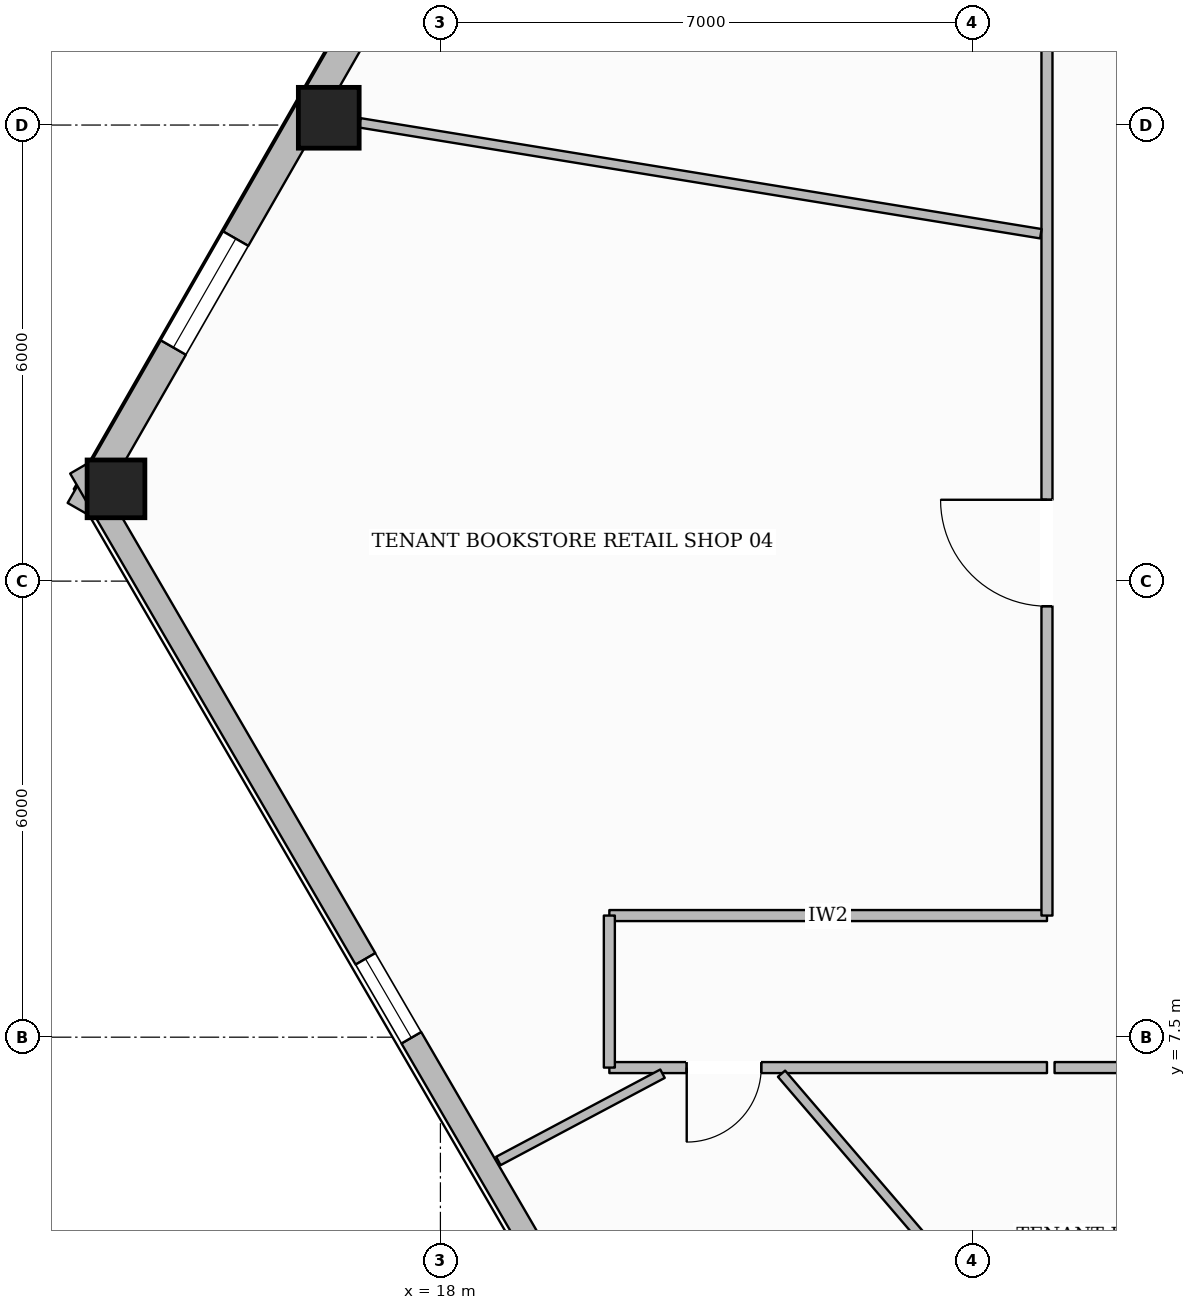
"""IFC4 building model, lengths in metres.
Left out: names, types, materials, properties, quantities, classifications, styles, units other than length and angle.
Written with IfcOpenShell. Run it as: python <this file> out.ifc"""

import sys

from ifc_helpers import new_model, si_unit, direction, frame, frame_2d, origin, origin_2d, place, context, subcontext, project, spatial, rectangle, hollow_rectangle, extrude, element, fill, save


model = new_model("IFC4")
c1 = context("Model", 3, precision=1e-05, world=origin(), true_north=direction((0.0, 1.0)))
c2 = subcontext(c1, "Body", "Model", "MODEL_VIEW")
j1 = project(units=[si_unit("LENGTHUNIT", "METRE"), si_unit("PLANEANGLEUNIT", "RADIAN")], contexts=[c1])
p1 = place(None, origin())
s1 = spatial("IfcSite", under=j1, at=p1, CompositionType="ELEMENT")
p2 = place(p1, origin())
s2 = spatial("IfcBuilding", under=s1, at=p2, CompositionType="ELEMENT")
p3 = place(p2, frame((0.0, 0.0, 44.5)))
s3 = spatial("IfcBuildingStorey", under=s2, at=p3, CompositionType="ELEMENT", Elevation=44.5)
p4 = place(p3, frame((16.531, 19.596, 0.0), z_axis=(0.0, 0.0, 1.0), x_axis=(1.0, 0.0, 0.0)))
e1 = element("IfcColumn", 1, at=p4, inside=s3, PredefinedType="COLUMN", context=c2, shape_type="SweptSolid", body=[
    extrude(hollow_rectangle(XDim=0.8, YDim=0.8, WallThickness=0.036, at=origin_2d()), origin(), (0.0, 0.0, 1.0), 3.59),
])
p5 = place(p3, frame((13.732, 14.714, 0.0), z_axis=(0.0, 0.0, 1.0), x_axis=(1.0, 0.0, 0.0)))
e2 = element("IfcColumn", 2, at=p5, inside=s3, PredefinedType="COLUMN", context=c2, shape_type="SweptSolid", body=[
    extrude(hollow_rectangle(XDim=0.76, YDim=0.76, WallThickness=0.035, at=origin_2d()), origin(), (0.0, 0.0, 1.0), 3.59),
])
p6 = place(p3, frame((13.26, 14.434, 0.0), z_axis=(0.0, 0.0, 1.0), x_axis=(0.497388557453, 0.867527880194, 0.0)))
e3 = element("IfcWall", 3, at=p6, inside=s3, PredefinedType="STANDARD", context=c2, shape_type="SweptSolid", body=[
    extrude(rectangle(XDim=34.723, YDim=0.38, at=frame_2d((17.361, 0.0))), origin(), (0.0, 0.0, 1.0), 2.97),
])
p7 = place(p6, frame((30.604, 0.0, 0.65)))
e4 = element("IfcOpeningElement", 4, at=p7, cuts=e3, PredefinedType="OPENING", context=c2, shape_type="SweptSolid", body=[
    extrude(rectangle(XDim=1.65, YDim=1.75, at=frame_2d((0.825, 0.875))), frame((0.0, 0.2, 0.0), z_axis=(0.0, -1.0, 0.0), x_axis=(1.0, 0.0, 0.0)), (0.0, 0.0, 1.0), 0.4),
])
p8 = place(p6, frame((24.976, 0.0, 0.65)))
e5 = element("IfcOpeningElement", 5, at=p8, cuts=e3, PredefinedType="OPENING", context=c2, shape_type="SweptSolid", body=[
    extrude(rectangle(XDim=1.65, YDim=1.75, at=frame_2d((0.825, 0.875))), frame((0.0, 0.2, 0.0), z_axis=(0.0, -1.0, 0.0), x_axis=(1.0, 0.0, 0.0)), (0.0, 0.0, 1.0), 0.4),
])
p9 = place(p6, frame((13.721, 0.0, 0.65)))
e6 = element("IfcOpeningElement", 6, at=p9, cuts=e3, PredefinedType="OPENING", context=c2, shape_type="SweptSolid", body=[
    extrude(rectangle(XDim=1.65, YDim=1.75, at=frame_2d((0.825, 0.875))), frame((0.0, 0.2, 0.0), z_axis=(0.0, -1.0, 0.0), x_axis=(1.0, 0.0, 0.0)), (0.0, 0.0, 1.0), 0.4),
])
p10 = place(p6, frame((8.094, 0.0, 0.65)))
e7 = element("IfcOpeningElement", 7, at=p10, cuts=e3, PredefinedType="OPENING", context=c2, shape_type="SweptSolid", body=[
    extrude(rectangle(XDim=1.65, YDim=1.75, at=frame_2d((0.825, 0.875))), frame((0.0, 0.2, 0.0), z_axis=(0.0, -1.0, 0.0), x_axis=(1.0, 0.0, 0.0)), (0.0, 0.0, 1.0), 0.4),
])
p11 = place(p6, frame((2.466, 0.0, 0.65)))
e8 = element("IfcOpeningElement", 8, at=p11, cuts=e3, PredefinedType="OPENING", context=c2, shape_type="SweptSolid", body=[
    extrude(rectangle(XDim=1.65, YDim=1.75, at=frame_2d((0.825, 0.875))), frame((0.0, 0.2, 0.0), z_axis=(0.0, -1.0, 0.0), x_axis=(1.0, 0.0, 0.0)), (0.0, 0.0, 1.0), 0.4),
])
p12 = place(p3, frame((21.373, 1.033, 0.0), z_axis=(0.0, 0.0, 1.0), x_axis=(-0.502582346065, 0.864529343298, 0.0)))
e9 = element("IfcWall", 9, at=p12, inside=s3, PredefinedType="STANDARD", context=c2, shape_type="SweptSolid", body=[
    extrude(rectangle(XDim=16.145, YDim=0.3, at=frame_2d((8.072, 0.0))), origin(), (0.0, 0.0, 1.0), 2.97),
])
p13 = place(p12, frame((7.472, 0.0, 0.65)))
e10 = element("IfcOpeningElement", 10, at=p13, cuts=e9, PredefinedType="OPENING", context=c2, shape_type="SweptSolid", body=[
    extrude(rectangle(XDim=1.2, YDim=1.7, at=frame_2d((0.6, 0.85))), frame((0.0, 0.16, 0.0), z_axis=(0.0, -1.0, 0.0), x_axis=(1.0, 0.0, 0.0)), (0.0, 0.0, 1.0), 0.32),
])
p14 = place(p3, frame((20.223, 9.1, 0.0), z_axis=(0.0, 0.0, 1.0), x_axis=(1.0, 0.0, 0.0)))
e11 = element("IfcWall", 11, at=p14, inside=s3, PredefinedType="PARTITIONING", context=c2, shape_type="SweptSolid", body=[
    extrude(rectangle(XDim=5.757, YDim=0.145, at=frame_2d((2.879, 0.0))), origin(), (0.0, 0.0, 1.0), 3.59),
])
p15 = place(p3, frame((25.98, 9.1, 0.0), z_axis=(0.0, 0.0, 1.0), x_axis=(0.0, 1.0, 0.0)))
e12 = element("IfcWall", 12, at=p15, inside=s3, PredefinedType="PARTITIONING", context=c2, shape_type="SweptSolid", body=[
    extrude(rectangle(XDim=16.0, YDim=0.145, at=frame_2d((8.0, 0.0))), origin(), (0.0, 0.0, 1.0), 3.278),
])
p16 = place(p15, frame((4.07, 0.0, 0.0)))
e13 = element("IfcOpeningElement", 13, at=p16, cuts=e12, PredefinedType="OPENING", context=c2, shape_type="SweptSolid", body=[
    extrude(rectangle(XDim=1.4, YDim=2.2, at=frame_2d((0.7, 1.1))), frame((0.0, 0.083, 0.0), z_axis=(0.0, -1.0, 0.0), x_axis=(1.0, 0.0, 0.0)), (0.0, 0.0, 1.0), 0.165),
])
p17 = place(p3, frame((49.92, 7.1, 0.0), z_axis=(0.0, 0.0, 1.0), x_axis=(-1.0, 0.0, 0.0)))
e14 = element("IfcWall", 14, at=p17, inside=s3, PredefinedType="PARTITIONING", context=c2, shape_type="SweptSolid", body=[
    extrude(rectangle(XDim=23.84, YDim=0.145, at=frame_2d((11.92, 0.0))), origin(), (0.0, 0.0, 1.0), 3.278),
])
p18 = place(p17, frame((20.935, 0.0, 0.0)))
e15 = element("IfcOpeningElement", 15, at=p18, cuts=e14, PredefinedType="OPENING", context=c2, shape_type="SweptSolid", body=[
    extrude(rectangle(XDim=0.98, YDim=2.15, at=frame_2d((0.49, 1.075))), frame((0.0, 0.083, 0.0), z_axis=(0.0, -1.0, 0.0), x_axis=(1.0, 0.0, 0.0)), (0.0, 0.0, 1.0), 0.165),
])
p19 = place(p17, frame((11.043, 0.0, 0.0)))
e16 = element("IfcOpeningElement", 16, at=p19, cuts=e14, PredefinedType="OPENING", context=c2, shape_type="SweptSolid", body=[
    extrude(rectangle(XDim=1.4, YDim=2.2, at=frame_2d((0.7, 1.1))), frame((0.0, 0.083, 0.0), z_axis=(0.0, -1.0, 0.0), x_axis=(1.0, 0.0, 0.0)), (0.0, 0.0, 1.0), 0.165),
])
p20 = place(p3, frame((25.98, 7.1, 0.0), z_axis=(0.0, 0.0, 1.0), x_axis=(-1.0, 0.0, 0.0)))
e17 = element("IfcWall", 17, at=p20, inside=s3, PredefinedType="PARTITIONING", context=c2, shape_type="SweptSolid", body=[
    extrude(rectangle(XDim=5.757, YDim=0.145, at=frame_2d((2.879, 0.0))), origin(), (0.0, 0.0, 1.0), 3.59),
])
p21 = place(p20, frame((3.76, 0.0, 0.0)))
e18 = element("IfcOpeningElement", 18, at=p21, cuts=e17, PredefinedType="OPENING", context=c2, shape_type="SweptSolid", body=[
    extrude(rectangle(XDim=0.98, YDim=2.15, at=frame_2d((0.49, 1.075))), frame((0.0, 0.083, 0.0), z_axis=(0.0, -1.0, 0.0), x_axis=(1.0, 0.0, 0.0)), (0.0, 0.0, 1.0), 0.165),
])
p22 = place(p3, frame((20.223, 7.1, 0.0), z_axis=(0.0, 0.0, 1.0), x_axis=(0.0, 1.0, 0.0)))
e19 = element("IfcWall", 19, at=p22, inside=s3, PredefinedType="PARTITIONING", context=c2, shape_type="SweptSolid", body=[
    extrude(rectangle(XDim=2.0, YDim=0.145, at=frame_2d((1.0, 0.0))), origin(), (0.0, 0.0, 1.0), 3.59),
])
p23 = place(p3, frame((25.899, 18.07, 0.0), z_axis=(0.0, 0.0, 1.0), x_axis=(-0.987001219007, 0.16071276763, 0.0)))
e20 = element("IfcWall", 20, at=p23, inside=s3, PredefinedType="PARTITIONING", context=c2, shape_type="SweptSolid", body=[
    extrude(rectangle(XDim=9.078, YDim=0.125, at=frame_2d((4.539, 0.0))), origin(), (0.0, 0.0, 1.0), 3.057),
])
p24 = place(p3, frame((20.922, 7.02, 0.0), z_axis=(0.0, 0.0, 1.0), x_axis=(-0.882926972808, -0.469510341407, 0.0)))
e21 = element("IfcWall", 21, at=p24, inside=s3, PredefinedType="PARTITIONING", context=c2, shape_type="SweptSolid", body=[
    extrude(rectangle(XDim=2.446, YDim=0.125, at=frame_2d((1.223, 0.0))), origin(), (0.0, 0.0, 1.0), 3.59),
])
p25 = place(p3, frame((22.488, 7.02, 0.0), z_axis=(0.0, 0.0, 1.0), x_axis=(0.651248981465, -0.758864127588, 0.0)))
e22 = element("IfcWall", 22, at=p25, inside=s3, PredefinedType="PARTITIONING", context=c2, shape_type="SweptSolid", body=[
    extrude(rectangle(XDim=6.677, YDim=0.125, at=frame_2d((3.338, 0.0))), origin(), (0.0, 0.0, 1.0), 3.59),
])
p26 = place(p11, origin())
e23 = element("IfcWindow", 23, at=p26, inside=s3, PartitioningType="SINGLE_PANEL", PredefinedType="WINDOW", context=c2, shape_type="SweptSolid", body=[
    extrude(rectangle(XDim=1.65, YDim=1.75, at=frame_2d((0.825, 0.875))), frame((0.0, 0.03, 0.0), z_axis=(0.0, -1.0, 0.0), x_axis=(1.0, 0.0, 0.0)), (0.0, 0.0, 1.0), 0.06),
])
fill(e8, e23)
p27 = place(p13, origin())
e24 = element("IfcWindow", 24, at=p27, inside=s3, PartitioningType="SINGLE_PANEL", PredefinedType="WINDOW", context=c2, shape_type="SweptSolid", body=[
    extrude(rectangle(XDim=1.2, YDim=1.7, at=frame_2d((0.6, 0.85))), frame((0.0, 0.03, 0.0), z_axis=(0.0, -1.0, 0.0), x_axis=(1.0, 0.0, 0.0)), (0.0, 0.0, 1.0), 0.06),
])
fill(e10, e24)
p28 = place(p16, origin())
e25 = element("IfcDoor", 25, at=p28, inside=s3, OperationType="SINGLE_SWING_RIGHT", PredefinedType="DOOR", context=c2, shape_type="SweptSolid", body=[
    extrude(rectangle(XDim=1.4, YDim=2.2, at=frame_2d((0.7, 1.1))), frame((0.0, 0.025, 0.0), z_axis=(0.0, -1.0, 0.0), x_axis=(1.0, 0.0, 0.0)), (0.0, 0.0, 1.0), 0.05),
])
fill(e13, e25)
p29 = place(p21, origin())
e26 = element("IfcDoor", 26, at=p29, inside=s3, OperationType="SINGLE_SWING_RIGHT", PredefinedType="DOOR", context=c2, shape_type="SweptSolid", body=[
    extrude(rectangle(XDim=0.98, YDim=2.15, at=frame_2d((0.49, 1.075))), frame((0.0, 0.025, 0.0), z_axis=(0.0, -1.0, 0.0), x_axis=(1.0, 0.0, 0.0)), (0.0, 0.0, 1.0), 0.05),
])
fill(e18, e26)
save(model, sys.argv[1])
